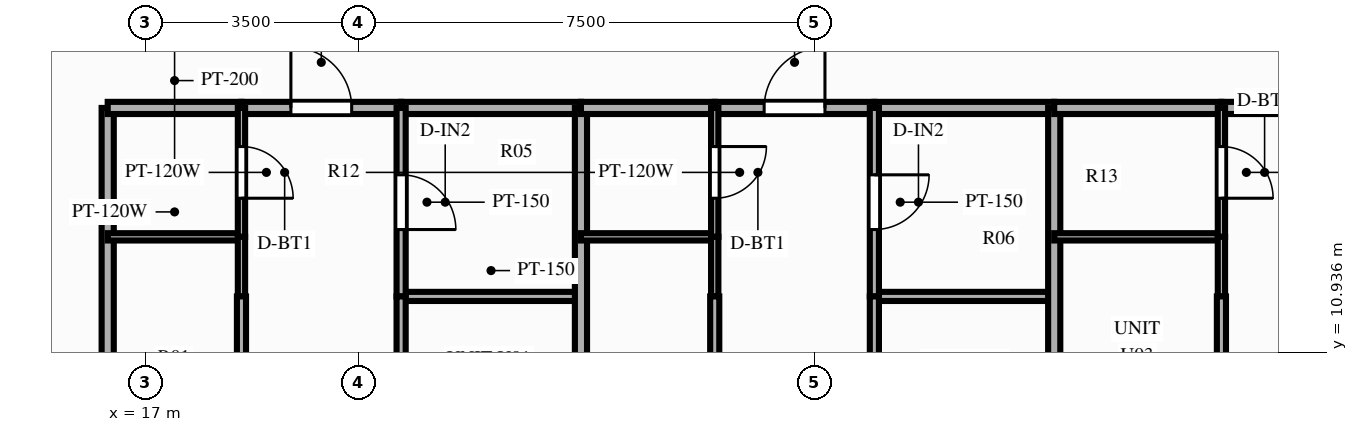
"""IFC4 building model, lengths in metres.
Left out: names, types, materials, properties, quantities, classifications, styles, units other than length and angle.
Written with IfcOpenShell. Run it as: python <this file> out.ifc"""

import sys

from ifc_helpers import new_model, si_unit, direction, frame, frame_2d, origin, place, context, subcontext, project, spatial, rectangle, extrude, source, transform, mapped, element, fill, save


model = new_model("IFC4")
c1 = context("Model", 3, precision=1e-05, world=origin(), true_north=direction((0.0, 1.0)))
c2 = subcontext(c1, "Body", "Model", "MODEL_VIEW")
j1 = project(units=[si_unit("LENGTHUNIT", "METRE"), si_unit("PLANEANGLEUNIT", "RADIAN")], contexts=[c1])
p1 = place(None, origin())
s1 = spatial("IfcSite", under=j1, at=p1, CompositionType="ELEMENT")
p2 = place(p1, origin())
s2 = spatial("IfcBuilding", under=s1, at=p2, CompositionType="ELEMENT")
p3 = place(p2, frame((0.0, 0.0, 80.85)))
s3 = spatial("IfcBuildingStorey", under=s2, at=p3, CompositionType="ELEMENT", Elevation=80.85)
p4 = place(p3, frame((16.38, 14.95, 0.0), z_axis=(0.0, 0.0, 1.0), x_axis=(0.0, -1.0, 0.0)))
e1 = element("IfcWall", 1, at=p4, inside=s3, PredefinedType="PARTITIONING", context=c2, shape_type="SweptSolid", body=[
    extrude(rectangle(XDim=11.8, YDim=0.2, at=frame_2d((5.9, 0.0))), origin(), (0.0, 0.0, 1.0), 2.79),
])
p5 = place(p3, frame((16.38, 14.95, 0.0), z_axis=(0.0, 0.0, 1.0), x_axis=(1.0, 0.0, 0.0)))
e2 = element("IfcWall", 2, at=p5, inside=s3, PredefinedType="PARTITIONING", context=c2, shape_type="SweptSolid", body=[
    extrude(rectangle(XDim=2.2, YDim=0.2, at=frame_2d((1.1, 0.0))), origin(), (0.0, 0.0, 1.0), 2.79),
])
p6 = place(p3, frame((18.58, 14.95, 0.0), z_axis=(0.0, 0.0, 1.0), x_axis=(1.0, 0.0, 0.0)))
e3 = element("IfcWall", 3, at=p6, inside=s3, PredefinedType="PARTITIONING", context=c2, shape_type="SweptSolid", body=[
    extrude(rectangle(XDim=2.625, YDim=0.2, at=frame_2d((1.313, 0.0))), origin(), (0.0, 0.0, 1.0), 2.79),
])
p7 = place(p6, frame((0.813, 0.0, 0.0)))
e4 = element("IfcOpeningElement", 4, at=p7, cuts=e3, PredefinedType="OPENING", context=c2, shape_type="SweptSolid", body=[
    extrude(rectangle(XDim=1.0, YDim=2.15, at=frame_2d((0.5, 1.075))), frame((0.0, 0.112, 0.0), z_axis=(0.0, -1.0, 0.0), x_axis=(1.0, 0.0, 0.0)), (0.0, 0.0, 1.0), 0.224),
])
p8 = place(p3, frame((21.206, 14.95, 0.0), z_axis=(0.0, 0.0, 1.0), x_axis=(1.0, 0.0, 0.0)))
e5 = element("IfcWall", 5, at=p8, inside=s3, PredefinedType="PARTITIONING", context=c2, shape_type="SweptSolid", body=[
    extrude(rectangle(XDim=2.958, YDim=0.2, at=frame_2d((1.479, 0.0))), origin(), (0.0, 0.0, 1.0), 2.79),
])
p9 = place(p3, frame((16.38, 12.83, 0.0), z_axis=(0.0, 0.0, 1.0), x_axis=(1.0, 0.0, 0.0)))
e6 = element("IfcWall", 6, at=p9, inside=s3, PredefinedType="PARTITIONING", context=c2, shape_type="SweptSolid", body=[
    extrude(rectangle(XDim=2.2, YDim=0.12, at=frame_2d((1.1, 0.0))), origin(), (0.0, 0.0, 1.0), 2.79),
])
p10 = place(p3, frame((21.206, 11.85, 0.0), z_axis=(0.0, 0.0, 1.0), x_axis=(1.0, 0.0, 0.0)))
e7 = element("IfcWall", 7, at=p10, inside=s3, PredefinedType="PARTITIONING", context=c2, shape_type="SweptSolid", body=[
    extrude(rectangle(XDim=2.958, YDim=0.15, at=frame_2d((1.479, 0.0))), origin(), (0.0, 0.0, 1.0), 2.79),
])
p11 = place(p3, frame((18.58, 14.95, 0.0), z_axis=(0.0, 0.0, 1.0), x_axis=(0.0, -1.0, 0.0)))
e8 = element("IfcWall", 8, at=p11, inside=s3, PredefinedType="PARTITIONING", context=c2, shape_type="SweptSolid", body=[
    extrude(rectangle(XDim=2.12, YDim=0.12, at=frame_2d((1.06, 0.0))), origin(), (0.0, 0.0, 1.0), 2.79),
])
p12 = place(p11, frame((0.635, 0.0, 0.0)))
e9 = element("IfcOpeningElement", 9, at=p12, cuts=e8, PredefinedType="OPENING", context=c2, shape_type="SweptSolid", body=[
    extrude(rectangle(XDim=0.85, YDim=2.05, at=frame_2d((0.425, 1.025))), frame((0.0, 0.072, 0.0), z_axis=(0.0, -1.0, 0.0), x_axis=(1.0, 0.0, 0.0)), (0.0, 0.0, 1.0), 0.144),
])
p13 = place(p3, frame((18.58, 12.83, 0.0), z_axis=(0.0, 0.0, 1.0), x_axis=(0.0, -1.0, 0.0)))
e10 = element("IfcWall", 10, at=p13, inside=s3, PredefinedType="PARTITIONING", context=c2, shape_type="SweptSolid", body=[
    extrude(rectangle(XDim=0.98, YDim=0.12, at=frame_2d((0.49, 0.0))), origin(), (0.0, 0.0, 1.0), 2.79),
])
p14 = place(p3, frame((18.58, 11.85, 0.0), z_axis=(0.0, 0.0, 1.0), x_axis=(0.0, -1.0, 0.0)))
e11 = element("IfcWall", 11, at=p14, inside=s3, PredefinedType="PARTITIONING", context=c2, shape_type="SweptSolid", body=[
    extrude(rectangle(XDim=8.7, YDim=0.15, at=frame_2d((4.35, 0.0))), origin(), (0.0, 0.0, 1.0), 2.79),
])
p15 = place(p14, frame((3.595, 0.0, 0.0)))
e12 = element("IfcOpeningElement", 12, at=p15, cuts=e11, PredefinedType="OPENING", context=c2, shape_type="SweptSolid", body=[
    extrude(rectangle(XDim=0.9, YDim=2.1, at=frame_2d((0.45, 1.05))), frame((0.0, 0.087, 0.0), z_axis=(0.0, -1.0, 0.0), x_axis=(1.0, 0.0, 0.0)), (0.0, 0.0, 1.0), 0.174),
])
p16 = place(p3, frame((21.206, 14.95, 0.0), z_axis=(0.0, 0.0, 1.0), x_axis=(0.0, -1.0, 0.0)))
e13 = element("IfcWall", 13, at=p16, inside=s3, PredefinedType="PARTITIONING", context=c2, shape_type="SweptSolid", body=[
    extrude(rectangle(XDim=3.1, YDim=0.15, at=frame_2d((1.55, 0.0))), origin(), (0.0, 0.0, 1.0), 2.79),
])
p17 = place(p16, frame((1.1, 0.0, 0.0)))
e14 = element("IfcOpeningElement", 14, at=p17, cuts=e13, PredefinedType="OPENING", context=c2, shape_type="SweptSolid", body=[
    extrude(rectangle(XDim=0.9, YDim=2.1, at=frame_2d((0.45, 1.05))), frame((0.0, 0.087, 0.0), z_axis=(0.0, -1.0, 0.0), x_axis=(1.0, 0.0, 0.0)), (0.0, 0.0, 1.0), 0.174),
])
p18 = place(p3, frame((21.206, 11.85, 0.0), z_axis=(0.0, 0.0, 1.0), x_axis=(0.0, -1.0, 0.0)))
e15 = element("IfcWall", 15, at=p18, inside=s3, PredefinedType="PARTITIONING", context=c2, shape_type="SweptSolid", body=[
    extrude(rectangle(XDim=8.7, YDim=0.15, at=frame_2d((4.35, 0.0))), origin(), (0.0, 0.0, 1.0), 2.79),
])
p19 = place(p18, frame((3.595, 0.0, 0.0)))
e16 = element("IfcOpeningElement", 16, at=p19, cuts=e15, PredefinedType="OPENING", context=c2, shape_type="SweptSolid", body=[
    extrude(rectangle(XDim=0.9, YDim=2.1, at=frame_2d((0.45, 1.05))), frame((0.0, 0.087, 0.0), z_axis=(0.0, -1.0, 0.0), x_axis=(1.0, 0.0, 0.0)), (0.0, 0.0, 1.0), 0.174),
])
p20 = place(p3, frame((24.163, 14.95, 0.0), z_axis=(0.0, 0.0, 1.0), x_axis=(0.0, -1.0, 0.0)))
e17 = element("IfcWall", 17, at=p20, inside=s3, PredefinedType="PARTITIONING", context=c2, shape_type="SweptSolid", body=[
    extrude(rectangle(XDim=11.8, YDim=0.2, at=frame_2d((5.9, 0.0))), origin(), (0.0, 0.0, 1.0), 2.79),
])
p21 = place(p3, frame((24.163, 14.95, 0.0), z_axis=(0.0, 0.0, 1.0), x_axis=(1.0, 0.0, 0.0)))
e18 = element("IfcWall", 18, at=p21, inside=s3, PredefinedType="PARTITIONING", context=c2, shape_type="SweptSolid", body=[
    extrude(rectangle(XDim=2.2, YDim=0.2, at=frame_2d((1.1, 0.0))), origin(), (0.0, 0.0, 1.0), 2.79),
])
p22 = place(p3, frame((26.363, 14.95, 0.0), z_axis=(0.0, 0.0, 1.0), x_axis=(1.0, 0.0, 0.0)))
e19 = element("IfcWall", 19, at=p22, inside=s3, PredefinedType="PARTITIONING", context=c2, shape_type="SweptSolid", body=[
    extrude(rectangle(XDim=2.625, YDim=0.2, at=frame_2d((1.313, 0.0))), origin(), (0.0, 0.0, 1.0), 2.79),
])
p23 = place(p22, frame((0.813, 0.0, 0.0)))
e20 = element("IfcOpeningElement", 20, at=p23, cuts=e19, PredefinedType="OPENING", context=c2, shape_type="SweptSolid", body=[
    extrude(rectangle(XDim=1.0, YDim=2.15, at=frame_2d((0.5, 1.075))), frame((0.0, 0.112, 0.0), z_axis=(0.0, -1.0, 0.0), x_axis=(1.0, 0.0, 0.0)), (0.0, 0.0, 1.0), 0.224),
])
p24 = place(p3, frame((28.989, 14.95, 0.0), z_axis=(0.0, 0.0, 1.0), x_axis=(1.0, 0.0, 0.0)))
e21 = element("IfcWall", 21, at=p24, inside=s3, PredefinedType="PARTITIONING", context=c2, shape_type="SweptSolid", body=[
    extrude(rectangle(XDim=2.958, YDim=0.2, at=frame_2d((1.479, 0.0))), origin(), (0.0, 0.0, 1.0), 2.79),
])
p25 = place(p3, frame((24.163, 12.83, 0.0), z_axis=(0.0, 0.0, 1.0), x_axis=(1.0, 0.0, 0.0)))
e22 = element("IfcWall", 22, at=p25, inside=s3, PredefinedType="PARTITIONING", context=c2, shape_type="SweptSolid", body=[
    extrude(rectangle(XDim=2.2, YDim=0.12, at=frame_2d((1.1, 0.0))), origin(), (0.0, 0.0, 1.0), 2.79),
])
p26 = place(p3, frame((28.989, 11.85, 0.0), z_axis=(0.0, 0.0, 1.0), x_axis=(1.0, 0.0, 0.0)))
e23 = element("IfcWall", 23, at=p26, inside=s3, PredefinedType="PARTITIONING", context=c2, shape_type="SweptSolid", body=[
    extrude(rectangle(XDim=2.958, YDim=0.15, at=frame_2d((1.479, 0.0))), origin(), (0.0, 0.0, 1.0), 2.79),
])
p27 = place(p3, frame((26.363, 14.95, 0.0), z_axis=(0.0, 0.0, 1.0), x_axis=(0.0, -1.0, 0.0)))
e24 = element("IfcWall", 24, at=p27, inside=s3, PredefinedType="PARTITIONING", context=c2, shape_type="SweptSolid", body=[
    extrude(rectangle(XDim=2.12, YDim=0.12, at=frame_2d((1.06, 0.0))), origin(), (0.0, 0.0, 1.0), 2.79),
])
p28 = place(p27, frame((0.635, 0.0, 0.0)))
e25 = element("IfcOpeningElement", 25, at=p28, cuts=e24, PredefinedType="OPENING", context=c2, shape_type="SweptSolid", body=[
    extrude(rectangle(XDim=0.85, YDim=2.05, at=frame_2d((0.425, 1.025))), frame((0.0, 0.072, 0.0), z_axis=(0.0, -1.0, 0.0), x_axis=(1.0, 0.0, 0.0)), (0.0, 0.0, 1.0), 0.144),
])
p29 = place(p3, frame((26.363, 12.83, 0.0), z_axis=(0.0, 0.0, 1.0), x_axis=(0.0, -1.0, 0.0)))
e26 = element("IfcWall", 26, at=p29, inside=s3, PredefinedType="PARTITIONING", context=c2, shape_type="SweptSolid", body=[
    extrude(rectangle(XDim=0.98, YDim=0.12, at=frame_2d((0.49, 0.0))), origin(), (0.0, 0.0, 1.0), 2.79),
])
p30 = place(p3, frame((26.363, 11.85, 0.0), z_axis=(0.0, 0.0, 1.0), x_axis=(0.0, -1.0, 0.0)))
e27 = element("IfcWall", 27, at=p30, inside=s3, PredefinedType="PARTITIONING", context=c2, shape_type="SweptSolid", body=[
    extrude(rectangle(XDim=8.7, YDim=0.15, at=frame_2d((4.35, 0.0))), origin(), (0.0, 0.0, 1.0), 2.79),
])
p31 = place(p30, frame((3.595, 0.0, 0.0)))
e28 = element("IfcOpeningElement", 28, at=p31, cuts=e27, PredefinedType="OPENING", context=c2, shape_type="SweptSolid", body=[
    extrude(rectangle(XDim=0.9, YDim=2.1, at=frame_2d((0.45, 1.05))), frame((0.0, 0.087, 0.0), z_axis=(0.0, -1.0, 0.0), x_axis=(1.0, 0.0, 0.0)), (0.0, 0.0, 1.0), 0.174),
])
p32 = place(p3, frame((28.989, 14.95, 0.0), z_axis=(0.0, 0.0, 1.0), x_axis=(0.0, -1.0, 0.0)))
e29 = element("IfcWall", 29, at=p32, inside=s3, PredefinedType="PARTITIONING", context=c2, shape_type="SweptSolid", body=[
    extrude(rectangle(XDim=3.1, YDim=0.15, at=frame_2d((1.55, 0.0))), origin(), (0.0, 0.0, 1.0), 2.79),
])
p33 = place(p32, frame((1.1, 0.0, 0.0)))
e30 = element("IfcOpeningElement", 30, at=p33, cuts=e29, PredefinedType="OPENING", context=c2, shape_type="SweptSolid", body=[
    extrude(rectangle(XDim=0.9, YDim=2.1, at=frame_2d((0.45, 1.05))), frame((0.0, 0.087, 0.0), z_axis=(0.0, -1.0, 0.0), x_axis=(1.0, 0.0, 0.0)), (0.0, 0.0, 1.0), 0.174),
])
p34 = place(p3, frame((28.989, 11.85, 0.0), z_axis=(0.0, 0.0, 1.0), x_axis=(0.0, -1.0, 0.0)))
e31 = element("IfcWall", 31, at=p34, inside=s3, PredefinedType="PARTITIONING", context=c2, shape_type="SweptSolid", body=[
    extrude(rectangle(XDim=8.7, YDim=0.15, at=frame_2d((4.35, 0.0))), origin(), (0.0, 0.0, 1.0), 2.79),
])
p35 = place(p34, frame((3.595, 0.0, 0.0)))
e32 = element("IfcOpeningElement", 32, at=p35, cuts=e31, PredefinedType="OPENING", context=c2, shape_type="SweptSolid", body=[
    extrude(rectangle(XDim=0.9, YDim=2.1, at=frame_2d((0.45, 1.05))), frame((0.0, 0.087, 0.0), z_axis=(0.0, -1.0, 0.0), x_axis=(1.0, 0.0, 0.0)), (0.0, 0.0, 1.0), 0.174),
])
p36 = place(p3, frame((31.946, 14.95, 0.0), z_axis=(0.0, 0.0, 1.0), x_axis=(0.0, -1.0, 0.0)))
e33 = element("IfcWall", 33, at=p36, inside=s3, PredefinedType="PARTITIONING", context=c2, shape_type="SweptSolid", body=[
    extrude(rectangle(XDim=11.8, YDim=0.2, at=frame_2d((5.9, 0.0))), origin(), (0.0, 0.0, 1.0), 2.79),
])
p37 = place(p3, frame((31.946, 14.95, 0.0), z_axis=(0.0, 0.0, 1.0), x_axis=(1.0, 0.0, 0.0)))
e34 = element("IfcWall", 34, at=p37, inside=s3, PredefinedType="PARTITIONING", context=c2, shape_type="SweptSolid", body=[
    extrude(rectangle(XDim=2.75, YDim=0.2, at=frame_2d((1.375, 0.0))), origin(), (0.0, 0.0, 1.0), 2.79),
])
p38 = place(p3, frame((34.696, 14.95, 0.0), z_axis=(0.0, 0.0, 1.0), x_axis=(1.0, 0.0, 0.0)))
e35 = element("IfcWall", 35, at=p38, inside=s3, PredefinedType="PARTITIONING", context=c2, shape_type="SweptSolid", body=[
    extrude(rectangle(XDim=7.784, YDim=0.2, at=frame_2d((3.892, 0.0))), origin(), (0.0, 0.0, 1.0), 2.79),
])
p39 = place(p38, frame((3.392, 0.0, 0.0)))
e36 = element("IfcOpeningElement", 36, at=p39, cuts=e35, PredefinedType="OPENING", context=c2, shape_type="SweptSolid", body=[
    extrude(rectangle(XDim=1.0, YDim=2.15, at=frame_2d((0.5, 1.075))), frame((0.0, 0.112, 0.0), z_axis=(0.0, -1.0, 0.0), x_axis=(1.0, 0.0, 0.0)), (0.0, 0.0, 1.0), 0.224),
])
p40 = place(p3, frame((31.946, 12.83, 0.0), z_axis=(0.0, 0.0, 1.0), x_axis=(1.0, 0.0, 0.0)))
e37 = element("IfcWall", 37, at=p40, inside=s3, PredefinedType="PARTITIONING", context=c2, shape_type="SweptSolid", body=[
    extrude(rectangle(XDim=2.75, YDim=0.12, at=frame_2d((1.375, 0.0))), origin(), (0.0, 0.0, 1.0), 2.79),
])
p41 = place(p3, frame((34.696, 14.95, 0.0), z_axis=(0.0, 0.0, 1.0), x_axis=(0.0, -1.0, 0.0)))
e38 = element("IfcWall", 38, at=p41, inside=s3, PredefinedType="PARTITIONING", context=c2, shape_type="SweptSolid", body=[
    extrude(rectangle(XDim=2.12, YDim=0.12, at=frame_2d((1.06, 0.0))), origin(), (0.0, 0.0, 1.0), 2.79),
])
p42 = place(p41, frame((0.635, 0.0, 0.0)))
e39 = element("IfcOpeningElement", 39, at=p42, cuts=e38, PredefinedType="OPENING", context=c2, shape_type="SweptSolid", body=[
    extrude(rectangle(XDim=0.85, YDim=2.05, at=frame_2d((0.425, 1.025))), frame((0.0, 0.072, 0.0), z_axis=(0.0, -1.0, 0.0), x_axis=(1.0, 0.0, 0.0)), (0.0, 0.0, 1.0), 0.144),
])
p43 = place(p3, frame((34.696, 12.83, 0.0), z_axis=(0.0, 0.0, 1.0), x_axis=(0.0, -1.0, 0.0)))
e40 = element("IfcWall", 40, at=p43, inside=s3, PredefinedType="PARTITIONING", context=c2, shape_type="SweptSolid", body=[
    extrude(rectangle(XDim=0.98, YDim=0.12, at=frame_2d((0.49, 0.0))), origin(), (0.0, 0.0, 1.0), 2.79),
])
p44 = place(p3, frame((34.696, 11.85, 0.0), z_axis=(0.0, 0.0, 1.0), x_axis=(0.0, -1.0, 0.0)))
e41 = element("IfcWall", 41, at=p44, inside=s3, PredefinedType="PARTITIONING", context=c2, shape_type="SweptSolid", body=[
    extrude(rectangle(XDim=8.7, YDim=0.15, at=frame_2d((4.35, 0.0))), origin(), (0.0, 0.0, 1.0), 2.79),
])
p45 = place(p44, frame((3.595, 0.0, 0.0)))
e42 = element("IfcOpeningElement", 42, at=p45, cuts=e41, PredefinedType="OPENING", context=c2, shape_type="SweptSolid", body=[
    extrude(rectangle(XDim=0.9, YDim=2.1, at=frame_2d((0.45, 1.05))), frame((0.0, 0.087, 0.0), z_axis=(0.0, -1.0, 0.0), x_axis=(1.0, 0.0, 0.0)), (0.0, 0.0, 1.0), 0.174),
])
m1 = source(origin(), c2, "Body", "SweptSolid", [
    extrude(rectangle(XDim=1.0, YDim=2.15, at=frame_2d((0.5, 1.075))), frame((0.0, 0.025, 0.0), z_axis=(0.0, -1.0, 0.0), x_axis=(1.0, 0.0, 0.0)), (0.0, 0.0, 1.0), 0.05),
])
p46 = place(p7, origin())
e43 = element("IfcDoor", 43, at=p46, inside=s3, OperationType="SINGLE_SWING_LEFT", PredefinedType="DOOR", context=c2, shape_type="MappedRepresentation", body=[
    mapped(m1, transform((0.0, 0.0, 0.0), scale=1.0)),
])
fill(e4, e43)
m2 = source(origin(), c2, "Body", "SweptSolid", [
    extrude(rectangle(XDim=0.85, YDim=2.05, at=frame_2d((0.425, 1.025))), frame((0.0, 0.025, 0.0), z_axis=(0.0, -1.0, 0.0), x_axis=(1.0, 0.0, 0.0)), (0.0, 0.0, 1.0), 0.05),
])
p47 = place(p12, origin())
e44 = element("IfcDoor", 44, at=p47, inside=s3, OperationType="SINGLE_SWING_RIGHT", PredefinedType="DOOR", context=c2, shape_type="MappedRepresentation", body=[
    mapped(m2, transform((0.0, 0.0, 0.0), scale=1.0)),
])
fill(e9, e44)
m3 = source(origin(), c2, "Body", "SweptSolid", [
    extrude(rectangle(XDim=0.9, YDim=2.1, at=frame_2d((0.45, 1.05))), frame((0.0, 0.025, 0.0), z_axis=(0.0, -1.0, 0.0), x_axis=(1.0, 0.0, 0.0)), (0.0, 0.0, 1.0), 0.05),
])
p48 = place(p17, origin())
e45 = element("IfcDoor", 45, at=p48, inside=s3, OperationType="SINGLE_SWING_RIGHT", PredefinedType="DOOR", context=c2, shape_type="MappedRepresentation", body=[
    mapped(m3, transform((0.0, 0.0, 0.0), scale=1.0)),
])
fill(e14, e45)
p49 = place(p23, origin())
e46 = element("IfcDoor", 46, at=p49, inside=s3, OperationType="SINGLE_SWING_RIGHT", PredefinedType="DOOR", context=c2, shape_type="MappedRepresentation", body=[
    mapped(m1, transform((0.0, 0.0, 0.0), scale=1.0)),
])
fill(e20, e46)
p50 = place(p28, origin())
e47 = element("IfcDoor", 47, at=p50, inside=s3, OperationType="SINGLE_SWING_LEFT", PredefinedType="DOOR", context=c2, shape_type="MappedRepresentation", body=[
    mapped(m2, transform((0.0, 0.0, 0.0), scale=1.0)),
])
fill(e25, e47)
p51 = place(p33, origin())
e48 = element("IfcDoor", 48, at=p51, inside=s3, OperationType="SINGLE_SWING_LEFT", PredefinedType="DOOR", context=c2, shape_type="MappedRepresentation", body=[
    mapped(m3, transform((0.0, 0.0, 0.0), scale=1.0)),
])
fill(e30, e48)
p52 = place(p42, origin())
e49 = element("IfcDoor", 49, at=p52, inside=s3, OperationType="SINGLE_SWING_RIGHT", PredefinedType="DOOR", context=c2, shape_type="MappedRepresentation", body=[
    mapped(m2, transform((0.0, 0.0, 0.0), scale=1.0)),
])
fill(e39, e49)
save(model, sys.argv[1])
